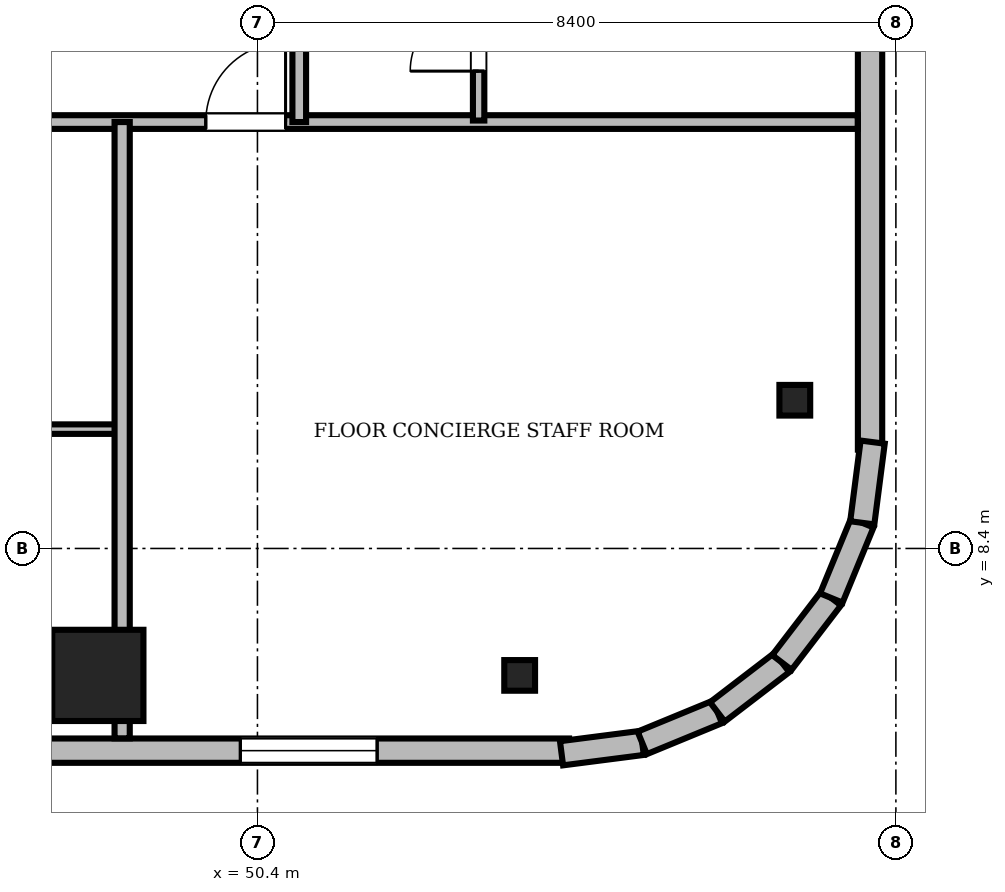
"""IFC4 building model, lengths in metres.
Left out: names, types, materials, properties, quantities, classifications, styles, units other than length and angle.
Written with IfcOpenShell. Run it as: python <this file> out.ifc"""

import sys

from ifc_helpers import new_model, si_unit, direction, frame, frame_2d, origin, origin_2d, place, context, subcontext, project, spatial, rectangle, i_section, extrude, source, transform, mapped, element, fill, save


model = new_model("IFC4")
c1 = context("Model", 3, precision=1e-05, world=origin(), true_north=direction((0.0, 1.0)))
c2 = subcontext(c1, "Body", "Model", "MODEL_VIEW")
j1 = project(units=[si_unit("LENGTHUNIT", "METRE"), si_unit("PLANEANGLEUNIT", "RADIAN")], contexts=[c1])
p1 = place(None, origin())
s1 = spatial("IfcSite", under=j1, at=p1, CompositionType="ELEMENT")
p2 = place(p1, origin())
s2 = spatial("IfcBuilding", under=s1, at=p2, CompositionType="ELEMENT")
p3 = place(p2, frame((0.0, 0.0, 282.2)))
s3 = spatial("IfcBuildingStorey", under=s2, at=p3, CompositionType="ELEMENT", Elevation=282.2)
m1 = source(origin(), c2, "Body", "SweptSolid", [
    extrude(rectangle(XDim=1.2, YDim=1.2, at=origin_2d()), origin(), (0.0, 0.0, 1.0), 5.403),
])
p4 = place(p3, frame((48.3, 6.73, 0.0), z_axis=(0.785450211726, 0.099954888295, 0.610800282585), x_axis=(-0.126239984183, 0.991999731045, 0.0)))
e1 = element("IfcColumn", 1, at=p4, inside=s3, PredefinedType="COLUMN", context=c2, shape_type="MappedRepresentation", body=[
    mapped(m1, transform((0.0, 0.0, 0.0), scale=1.0)),
])
m2 = source(origin(), c2, "Body", "SweptSolid", [
    extrude(i_section(OverallWidth=0.405, OverallDepth=0.403, WebThickness=0.018, FlangeThickness=0.028, FilletRadius=0.015, at=origin_2d()), origin(), (0.0, 0.0, 1.0), 5.27),
])
p5 = place(p3, frame((53.85, 6.73, 0.0), z_axis=(0.772887480351, 0.102477198737, 0.626213515069), x_axis=(-0.131439732023, 0.991324163352, 0.0)))
e2 = element("IfcColumn", 2, at=p5, inside=s3, PredefinedType="COLUMN", context=c2, shape_type="MappedRepresentation", body=[
    mapped(m2, transform((0.0, 0.0, 0.0), scale=1.0)),
])
m3 = source(origin(), c2, "Body", "SweptSolid", [
    extrude(i_section(OverallWidth=0.405, OverallDepth=0.403, WebThickness=0.018, FlangeThickness=0.028, FilletRadius=0.015, at=origin_2d()), origin(), (0.0, 0.0, 1.0), 5.172),
])
p6 = place(p3, frame((57.47, 10.35, 0.0), z_axis=(0.76559131593, 0.082553588876, 0.638008496759), x_axis=(-0.107208370415, 0.994236574118, 0.0)))
e3 = element("IfcColumn", 3, at=p6, inside=s3, PredefinedType="COLUMN", context=c2, shape_type="MappedRepresentation", body=[
    mapped(m3, transform((0.0, 0.0, 0.0), scale=1.0)),
])
m4 = source(origin(), c2, "Body", "SweptSolid", [
    extrude(rectangle(XDim=12.2, YDim=0.32, at=frame_2d((6.1, 0.0))), origin(), (0.0, 0.0, 1.0), 3.3),
])
p7 = place(p3, frame((42.3, 5.74, 0.0), z_axis=(0.0, 0.0, 1.0), x_axis=(1.0, 0.0, 0.0)))
e4 = element("IfcWall", 4, at=p7, inside=s3, PredefinedType="SOLIDWALL", context=c2, shape_type="MappedRepresentation", body=[
    mapped(m4, transform((0.0, 0.0, 0.0), scale=1.0)),
])
m5 = source(origin(), c2, "Body", "SweptSolid", [
    extrude(rectangle(XDim=1.8, YDim=2.4, at=frame_2d((0.9, 1.2))), frame((0.0, 0.17, 0.0), z_axis=(0.0, -1.0, 0.0), x_axis=(1.0, 0.0, 0.0)), (0.0, 0.0, 1.0), 0.34),
])
p8 = place(p7, frame((7.875, 0.0, 0.64)))
e5 = element("IfcOpeningElement", 5, at=p8, cuts=e4, PredefinedType="OPENING", context=c2, shape_type="MappedRepresentation", body=[
    mapped(m5, transform((0.0, 0.0, 0.0), scale=1.0)),
])
m6 = source(origin(), c2, "Body", "SweptSolid", [
    extrude(rectangle(XDim=12.2, YDim=0.32, at=frame_2d((6.1, 0.0))), origin(), (0.0, 0.0, 1.0), 2.481),
])
p9 = place(p3, frame((58.46, 9.7, 0.0), z_axis=(0.0, 0.0, 1.0), x_axis=(0.0, 1.0, 0.0)))
e6 = element("IfcWall", 6, at=p9, inside=s3, PredefinedType="SOLIDWALL", context=c2, shape_type="MappedRepresentation", body=[
    mapped(m6, transform((0.0, 0.0, 0.0), scale=1.0)),
])
m7 = source(origin(), c2, "Body", "SweptSolid", [
    extrude(rectangle(XDim=1.4, YDim=2.3, at=frame_2d((0.7, 1.15))), frame((0.0, 0.17, 0.0), z_axis=(0.0, -1.0, 0.0), x_axis=(1.0, 0.0, 0.0)), (0.0, 0.0, 1.0), 0.34),
])
p10 = place(p9, frame((7.516, 0.0, 0.0)))
e7 = element("IfcOpeningElement", 7, at=p10, cuts=e6, PredefinedType="OPENING", context=c2, shape_type="MappedRepresentation", body=[
    mapped(m7, transform((0.0, 0.0, 0.0), scale=1.0)),
])
m8 = source(origin(), c2, "Body", "SweptSolid", [
    extrude(rectangle(XDim=1.071, YDim=0.32, at=frame_2d((0.535, 0.0))), origin(), (0.0, 0.0, 1.0), 3.3),
])
p11 = place(p3, frame((54.401, 5.706, 0.0), z_axis=(0.0, 0.0, 1.0), x_axis=(0.99181144545, 0.127710832249, 0.0)))
e8 = element("IfcWall", 8, at=p11, inside=s3, PredefinedType="SOLIDWALL", context=c2, shape_type="MappedRepresentation", body=[
    mapped(m8, transform((0.0, 0.0, 0.0), scale=1.0)),
])
m9 = source(origin(), c2, "Body", "SweptSolid", [
    extrude(rectangle(XDim=1.07, YDim=0.32, at=frame_2d((0.535, 0.0))), origin(), (0.0, 0.0, 1.0), 3.3),
])
p12 = place(p3, frame((55.463, 5.842, 0.0), z_axis=(0.0, 0.0, 1.0), x_axis=(0.92460245023, 0.380933470608, 0.0)))
e9 = element("IfcWall", 9, at=p12, inside=s3, PredefinedType="SOLIDWALL", context=c2, shape_type="MappedRepresentation", body=[
    mapped(m9, transform((0.0, 0.0, 0.0), scale=1.0)),
])
m10 = source(origin(), c2, "Body", "SweptSolid", [
    extrude(rectangle(XDim=1.069, YDim=0.32, at=frame_2d((0.534, 0.0))), origin(), (0.0, 0.0, 1.0), 2.42),
])
p13 = place(p3, frame((56.452, 6.25, 0.0), z_axis=(0.0, 0.0, 1.0), x_axis=(0.793735015643, 0.60826369688, 0.0)))
e10 = element("IfcWall", 10, at=p13, inside=s3, PredefinedType="SOLIDWALL", context=c2, shape_type="MappedRepresentation", body=[
    mapped(m10, transform((0.0, 0.0, 0.0), scale=1.0)),
])
m11 = source(origin(), c2, "Body", "SweptSolid", [
    extrude(rectangle(XDim=1.069, YDim=0.32, at=frame_2d((0.535, 0.0))), origin(), (0.0, 0.0, 1.0), 2.42),
])
p14 = place(p3, frame((57.3, 6.9, 0.0), z_axis=(0.0, 0.0, 1.0), x_axis=(0.608407570543, 0.793624740104, 0.0)))
e11 = element("IfcWall", 11, at=p14, inside=s3, PredefinedType="SOLIDWALL", context=c2, shape_type="MappedRepresentation", body=[
    mapped(m11, transform((0.0, 0.0, 0.0), scale=1.0)),
])
m12 = source(origin(), c2, "Body", "SweptSolid", [
    extrude(rectangle(XDim=1.07, YDim=0.32, at=frame_2d((0.535, 0.0))), origin(), (0.0, 0.0, 1.0), 2.42),
])
p15 = place(p3, frame((57.95, 7.748, 0.0), z_axis=(0.0, 0.0, 1.0), x_axis=(0.380738324673, 0.92468282569, 0.0)))
e12 = element("IfcWall", 12, at=p15, inside=s3, PredefinedType="SOLIDWALL", context=c2, shape_type="MappedRepresentation", body=[
    mapped(m12, transform((0.0, 0.0, 0.0), scale=1.0)),
])
p16 = place(p3, frame((58.358, 8.737, 0.0), z_axis=(0.0, 0.0, 1.0), x_axis=(0.127710832249, 0.99181144545, 0.0)))
e13 = element("IfcWall", 13, at=p16, inside=s3, PredefinedType="SOLIDWALL", context=c2, shape_type="MappedRepresentation", body=[
    mapped(m8, transform((0.0, 0.0, 0.0), scale=1.0)),
])
m13 = source(origin(), c2, "Body", "SweptSolid", [
    extrude(rectangle(XDim=38.596, YDim=0.18, at=frame_2d((19.298, 0.0))), origin(), (0.0, 0.0, 1.0), 2.08),
])
p17 = place(p3, frame((19.702, 14.01, 0.0), z_axis=(0.0, 0.0, 1.0), x_axis=(1.0, 0.0, 0.0)))
e14 = element("IfcWall", 14, at=p17, inside=s3, PredefinedType="PARTITIONING", context=c2, shape_type="MappedRepresentation", body=[
    mapped(m13, transform((0.0, 0.0, 0.0), scale=1.0)),
])
m14 = source(origin(), c2, "Body", "SweptSolid", [
    extrude(rectangle(XDim=1.05, YDim=2.2, at=frame_2d((0.525, 1.1))), frame((0.0, 0.1, 0.0), z_axis=(0.0, -1.0, 0.0), x_axis=(1.0, 0.0, 0.0)), (0.0, 0.0, 1.0), 0.2),
])
p18 = place(p17, frame((7.568, 0.0, 0.0)))
e15 = element("IfcOpeningElement", 15, at=p18, cuts=e14, PredefinedType="OPENING", context=c2, shape_type="MappedRepresentation", body=[
    mapped(m14, transform((0.0, 0.0, 0.0), scale=1.0)),
])
p19 = place(p17, frame((11.731, 0.0, 0.0)))
e16 = element("IfcOpeningElement", 16, at=p19, cuts=e14, PredefinedType="OPENING", context=c2, shape_type="MappedRepresentation", body=[
    mapped(m14, transform((0.0, 0.0, 0.0), scale=1.0)),
])
p20 = place(p17, frame((18.398, 0.0, 0.0)))
e17 = element("IfcOpeningElement", 17, at=p20, cuts=e14, PredefinedType="OPENING", context=c2, shape_type="MappedRepresentation", body=[
    mapped(m14, transform((0.0, 0.0, 0.0), scale=1.0)),
])
p21 = place(p17, frame((25.065, 0.0, 0.0)))
e18 = element("IfcOpeningElement", 18, at=p21, cuts=e14, PredefinedType="OPENING", context=c2, shape_type="MappedRepresentation", body=[
    mapped(m14, transform((0.0, 0.0, 0.0), scale=1.0)),
])
p22 = place(p17, frame((30.018, 0.0, 0.0)))
e19 = element("IfcOpeningElement", 19, at=p22, cuts=e14, PredefinedType="OPENING", context=c2, shape_type="MappedRepresentation", body=[
    mapped(m14, transform((0.0, 0.0, 0.0), scale=1.0)),
])
m15 = source(origin(), c2, "Body", "SweptSolid", [
    extrude(rectangle(XDim=27.09, YDim=0.18, at=frame_2d((13.545, 0.0))), origin(), (0.0, 0.0, 1.0), 2.478),
])
p23 = place(p3, frame((50.95, 14.01, 0.0), z_axis=(0.0, 0.0, 1.0), x_axis=(0.0, 1.0, 0.0)))
e20 = element("IfcWall", 20, at=p23, inside=s3, PredefinedType="PARTITIONING", context=c2, shape_type="MappedRepresentation", body=[
    mapped(m15, transform((0.0, 0.0, 0.0), scale=1.0)),
])
p24 = place(p23, frame((4.024, 0.0, 0.0)))
e21 = element("IfcOpeningElement", 21, at=p24, cuts=e20, PredefinedType="OPENING", context=c2, shape_type="MappedRepresentation", body=[
    mapped(m14, transform((0.0, 0.0, 0.0), scale=1.0)),
])
p25 = place(p23, frame((9.556, 0.0, 0.0)))
e22 = element("IfcOpeningElement", 22, at=p25, cuts=e20, PredefinedType="OPENING", context=c2, shape_type="MappedRepresentation", body=[
    mapped(m14, transform((0.0, 0.0, 0.0), scale=1.0)),
])
p26 = place(p23, frame((17.459, 0.0, 0.0)))
e23 = element("IfcOpeningElement", 23, at=p26, cuts=e20, PredefinedType="OPENING", context=c2, shape_type="MappedRepresentation", body=[
    mapped(m14, transform((0.0, 0.0, 0.0), scale=1.0)),
])
p27 = place(p23, frame((24.176, 0.0, 0.0)))
e24 = element("IfcOpeningElement", 24, at=p27, cuts=e20, PredefinedType="OPENING", context=c2, shape_type="MappedRepresentation", body=[
    mapped(m14, transform((0.0, 0.0, 0.0), scale=1.0)),
])
m16 = source(origin(), c2, "Body", "SweptSolid", [
    extrude(rectangle(XDim=6.667, YDim=0.125, at=frame_2d((3.333, 0.0))), origin(), (0.0, 0.0, 1.0), 2.478),
])
p28 = place(p3, frame((41.953, 9.97, 0.0), z_axis=(0.0, 0.0, 1.0), x_axis=(1.0, 0.0, 0.0)))
e25 = element("IfcWall", 25, at=p28, inside=s3, PredefinedType="PARTITIONING", context=c2, shape_type="MappedRepresentation", body=[
    mapped(m16, transform((0.0, 0.0, 0.0), scale=1.0)),
])
m17 = source(origin(), c2, "Body", "SweptSolid", [
    extrude(rectangle(XDim=0.95, YDim=2.15, at=frame_2d((0.475, 1.075))), frame((0.0, 0.073, 0.0), z_axis=(0.0, -1.0, 0.0), x_axis=(1.0, 0.0, 0.0)), (0.0, 0.0, 1.0), 0.145),
])
p29 = place(p28, frame((2.853, 0.0, 0.0)))
e26 = element("IfcOpeningElement", 26, at=p29, cuts=e25, PredefinedType="OPENING", context=c2, shape_type="MappedRepresentation", body=[
    mapped(m17, transform((0.0, 0.0, 0.0), scale=1.0)),
])
m18 = source(origin(), c2, "Body", "SweptSolid", [
    extrude(rectangle(XDim=2.29, YDim=0.15, at=frame_2d((1.145, 0.0))), origin(), (0.0, 0.0, 1.0), 2.478),
])
p30 = place(p3, frame((53.31, 14.03, 0.0), z_axis=(0.0, 0.0, 1.0), x_axis=(0.0, 1.0, 0.0)))
e27 = element("IfcWall", 27, at=p30, inside=s3, PredefinedType="PARTITIONING", context=c2, shape_type="MappedRepresentation", body=[
    mapped(m18, transform((0.0, 0.0, 0.0), scale=1.0)),
])
m19 = source(origin(), c2, "Body", "SweptSolid", [
    extrude(rectangle(XDim=0.9, YDim=2.1, at=frame_2d((0.45, 1.05))), frame((0.0, 0.085, 0.0), z_axis=(0.0, -1.0, 0.0), x_axis=(1.0, 0.0, 0.0)), (0.0, 0.0, 1.0), 0.17),
])
p31 = place(p30, frame((0.65, 0.0, 0.0)))
e28 = element("IfcOpeningElement", 28, at=p31, cuts=e27, PredefinedType="OPENING", context=c2, shape_type="MappedRepresentation", body=[
    mapped(m19, transform((0.0, 0.0, 0.0), scale=1.0)),
])
m20 = source(origin(), c2, "Body", "SweptSolid", [
    extrude(rectangle(XDim=8.108, YDim=0.2, at=frame_2d((4.054, 0.0))), origin(), (0.0, 0.0, 1.0), 2.08),
])
p32 = place(p3, frame((48.62, 5.902, 0.0), z_axis=(0.0, 0.0, 1.0), x_axis=(0.0, 1.0, 0.0)))
e29 = element("IfcWall", 29, at=p32, inside=s3, PredefinedType="PARTITIONING", context=c2, shape_type="MappedRepresentation", body=[
    mapped(m20, transform((0.0, 0.0, 0.0), scale=1.0)),
])
m21 = source(origin(), c2, "Body", "SweptSolid", [
    extrude(rectangle(XDim=1.8, YDim=2.4, at=frame_2d((0.9, 1.2))), frame((0.0, 0.03, 0.0), z_axis=(0.0, -1.0, 0.0), x_axis=(1.0, 0.0, 0.0)), (0.0, 0.0, 1.0), 0.06),
])
p33 = place(p8, origin())
e30 = element("IfcWindow", 30, at=p33, inside=s3, PartitioningType="SINGLE_PANEL", PredefinedType="WINDOW", context=c2, shape_type="MappedRepresentation", body=[
    mapped(m21, transform((0.0, 0.0, 0.0), scale=1.0)),
])
fill(e5, e30)
m22 = source(origin(), c2, "Body", "SweptSolid", [
    extrude(rectangle(XDim=1.05, YDim=2.2, at=frame_2d((0.525, 1.1))), frame((0.0, 0.025, 0.0), z_axis=(0.0, -1.0, 0.0), x_axis=(1.0, 0.0, 0.0)), (0.0, 0.0, 1.0), 0.05),
])
p34 = place(p22, origin())
e31 = element("IfcDoor", 31, at=p34, inside=s3, OperationType="SINGLE_SWING_RIGHT", PredefinedType="DOOR", context=c2, shape_type="MappedRepresentation", body=[
    mapped(m22, transform((0.0, 0.0, 0.0), scale=1.0)),
])
fill(e19, e31)
m23 = source(origin(), c2, "Body", "SweptSolid", [
    extrude(rectangle(XDim=0.9, YDim=2.1, at=frame_2d((0.45, 1.05))), frame((0.0, 0.025, 0.0), z_axis=(0.0, -1.0, 0.0), x_axis=(1.0, 0.0, 0.0)), (0.0, 0.0, 1.0), 0.05),
])
p35 = place(p31, origin())
e32 = element("IfcDoor", 32, at=p35, inside=s3, OperationType="SINGLE_SWING_LEFT", PredefinedType="DOOR", context=c2, shape_type="MappedRepresentation", body=[
    mapped(m23, transform((0.0, 0.0, 0.0), scale=1.0)),
])
fill(e28, e32)
save(model, sys.argv[1])
